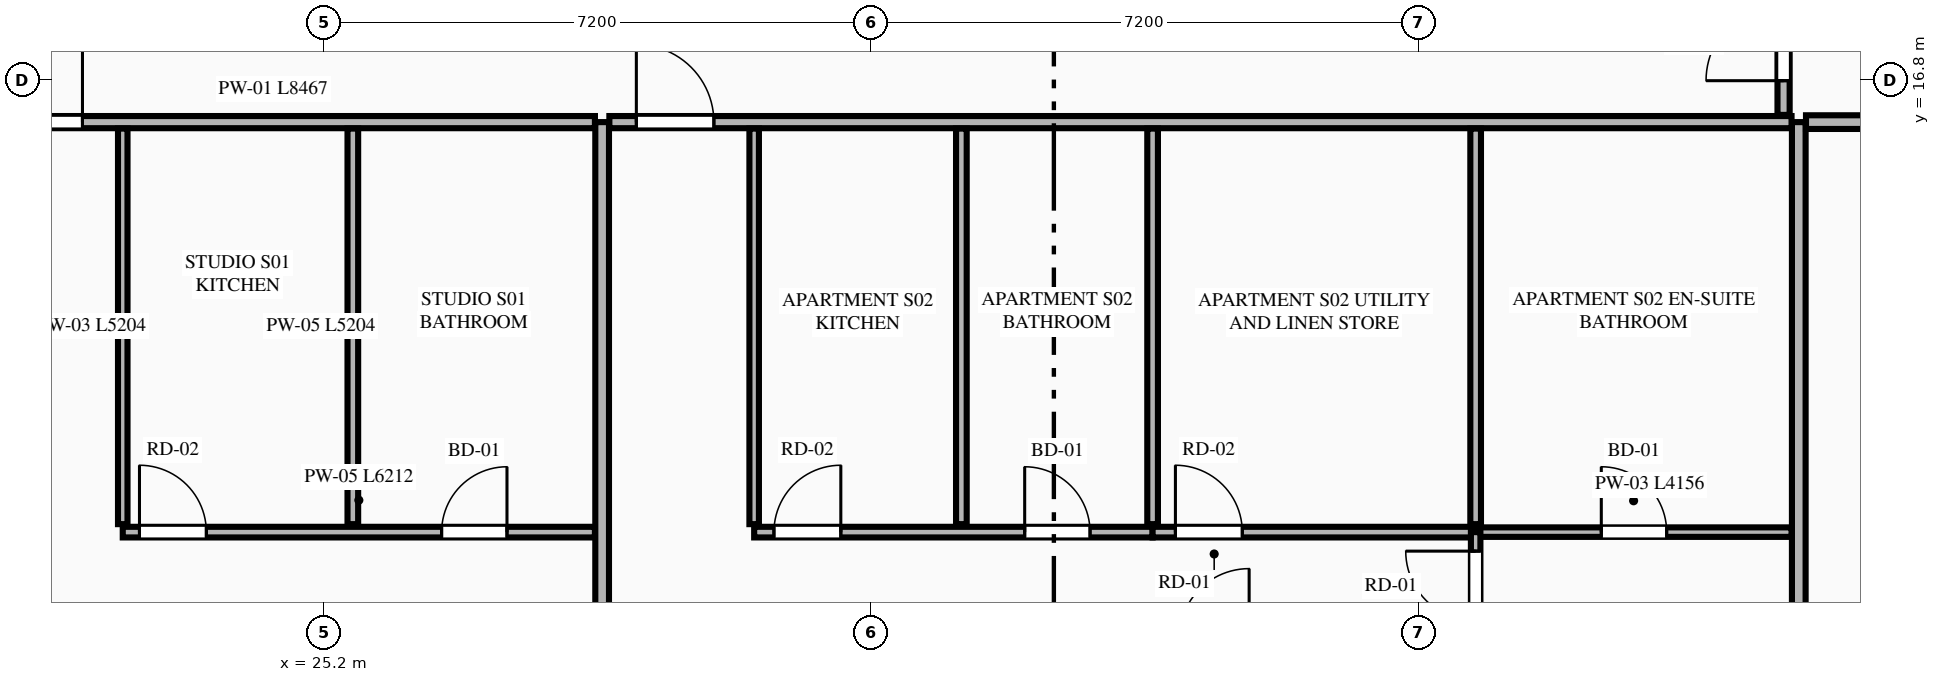
"""IFC4 building model, lengths in metres.
Left out: names, types, materials, properties, quantities, classifications, styles, units other than length and angle.
Written with IfcOpenShell. Run it as: python <this file> out.ifc"""

import sys

from ifc_helpers import new_model, si_unit, direction, frame, frame_2d, origin, place, context, subcontext, project, spatial, rectangle, extrude, element, fill, save


model = new_model("IFC4")
c1 = context("Model", 3, precision=1e-05, world=origin(), true_north=direction((0.0, 1.0)))
c2 = subcontext(c1, "Body", "Model", "MODEL_VIEW")
j1 = project(units=[si_unit("LENGTHUNIT", "METRE"), si_unit("PLANEANGLEUNIT", "RADIAN")], contexts=[c1])
p1 = place(None, origin())
s1 = spatial("IfcSite", under=j1, at=p1, CompositionType="ELEMENT")
p2 = place(p1, origin())
s2 = spatial("IfcBuilding", under=s1, at=p2, CompositionType="ELEMENT")
p3 = place(p2, frame((0.0, 0.0, 182.55)))
s3 = spatial("IfcBuildingStorey", under=s2, at=p3, CompositionType="ELEMENT", Elevation=182.55)
p4 = place(p3, frame((28.857, 5.755, 0.0), z_axis=(0.0, 0.0, 1.0), x_axis=(0.0, 1.0, 0.0)))
e1 = element("IfcWall", 1, at=p4, inside=s3, PredefinedType="PARTITIONING", context=c2, shape_type="SweptSolid", body=[
    extrude(rectangle(XDim=10.495, YDim=0.18, at=frame_2d((5.248, 0.0))), origin(), (0.0, 0.0, 1.0), 2.807),
])
p5 = place(p3, frame((44.6, 5.968, 0.0), z_axis=(0.0, 0.0, 1.0), x_axis=(0.0, 1.0, 0.0)))
e2 = element("IfcWall", 2, at=p5, inside=s3, PredefinedType="PARTITIONING", context=c2, shape_type="SweptSolid", body=[
    extrude(rectangle(XDim=10.282, YDim=0.18, at=frame_2d((5.141, 0.0))), origin(), (0.0, 0.0, 1.0), 3.35),
])
p6 = place(p3, frame((20.295, 16.25, 0.0), z_axis=(0.0, 0.0, 1.0), x_axis=(1.0, 0.0, 0.0)))
e3 = element("IfcWall", 3, at=p6, inside=s3, PredefinedType="PARTITIONING", context=c2, shape_type="SweptSolid", body=[
    extrude(rectangle(XDim=8.467, YDim=0.16, at=frame_2d((4.233, 0.0))), origin(), (0.0, 0.0, 1.0), 3.35),
])
p7 = place(p6, frame((0.705, 0.0, 0.0)))
e4 = element("IfcOpeningElement", 4, at=p7, cuts=e3, PredefinedType="OPENING", context=c2, shape_type="SweptSolid", body=[
    extrude(rectangle(XDim=1.02, YDim=2.25, at=frame_2d((0.51, 1.125))), frame((0.0, 0.09, 0.0), z_axis=(0.0, -1.0, 0.0), x_axis=(1.0, 0.0, 0.0)), (0.0, 0.0, 1.0), 0.18),
])
p8 = place(p3, frame((22.55, 10.961, 0.0), z_axis=(0.0, 0.0, 1.0), x_axis=(0.0, 1.0, 0.0)))
e5 = element("IfcWall", 5, at=p8, inside=s3, PredefinedType="PARTITIONING", context=c2, shape_type="SweptSolid", body=[
    extrude(rectangle(XDim=5.204, YDim=0.125, at=frame_2d((2.602, 0.0))), origin(), (0.0, 0.0, 1.0), 2.807),
])
p9 = place(p3, frame((22.55, 10.856, 0.0), z_axis=(0.0, 0.0, 1.0), x_axis=(1.0, 0.0, 0.0)))
e6 = element("IfcWall", 6, at=p9, inside=s3, PredefinedType="PLUMBINGWALL", context=c2, shape_type="SweptSolid", body=[
    extrude(rectangle(XDim=6.212, YDim=0.14, at=frame_2d((3.106, 0.0))), origin(), (0.0, 0.0, 1.0), 3.35),
])
p10 = place(p9, frame((4.195, 0.0, 0.0)))
e7 = element("IfcOpeningElement", 7, at=p10, cuts=e6, PredefinedType="OPENING", context=c2, shape_type="SweptSolid", body=[
    extrude(rectangle(XDim=0.86, YDim=2.1, at=frame_2d((0.43, 1.05))), frame((0.0, 0.08, 0.0), z_axis=(0.0, -1.0, 0.0), x_axis=(1.0, 0.0, 0.0)), (0.0, 0.0, 1.0), 0.16),
])
p11 = place(p9, frame((0.22, 0.0, 0.0)))
e8 = element("IfcOpeningElement", 8, at=p11, cuts=e6, PredefinedType="OPENING", context=c2, shape_type="SweptSolid", body=[
    extrude(rectangle(XDim=0.88, YDim=2.15, at=frame_2d((0.44, 1.075))), frame((0.0, 0.08, 0.0), z_axis=(0.0, -1.0, 0.0), x_axis=(1.0, 0.0, 0.0)), (0.0, 0.0, 1.0), 0.16),
])
p12 = place(p3, frame((25.577, 10.961, 0.0), z_axis=(0.0, 0.0, 1.0), x_axis=(0.0, 1.0, 0.0)))
e9 = element("IfcWall", 9, at=p12, inside=s3, PredefinedType="PLUMBINGWALL", context=c2, shape_type="SweptSolid", body=[
    extrude(rectangle(XDim=5.204, YDim=0.14, at=frame_2d((2.602, 0.0))), origin(), (0.0, 0.0, 1.0), 3.35),
])
p13 = place(p3, frame((28.952, 16.25, 0.0), z_axis=(0.0, 0.0, 1.0), x_axis=(1.0, 0.0, 0.0)))
e10 = element("IfcWall", 10, at=p13, inside=s3, PredefinedType="PARTITIONING", context=c2, shape_type="SweptSolid", body=[
    extrude(rectangle(XDim=15.553, YDim=0.16, at=frame_2d((7.776, 0.0))), origin(), (0.0, 0.0, 1.0), 3.35),
])
p14 = place(p13, frame((0.355, 0.0, 0.0)))
e11 = element("IfcOpeningElement", 11, at=p14, cuts=e10, PredefinedType="OPENING", context=c2, shape_type="SweptSolid", body=[
    extrude(rectangle(XDim=1.02, YDim=2.25, at=frame_2d((0.51, 1.125))), frame((0.0, 0.09, 0.0), z_axis=(0.0, -1.0, 0.0), x_axis=(1.0, 0.0, 0.0)), (0.0, 0.0, 1.0), 0.18),
])
p15 = place(p3, frame((30.857, 10.961, 0.0), z_axis=(0.0, 0.0, 1.0), x_axis=(0.0, 1.0, 0.0)))
e12 = element("IfcWall", 12, at=p15, inside=s3, PredefinedType="PARTITIONING", context=c2, shape_type="SweptSolid", body=[
    extrude(rectangle(XDim=5.204, YDim=0.125, at=frame_2d((2.602, 0.0))), origin(), (0.0, 0.0, 1.0), 3.35),
])
p16 = place(p3, frame((30.857, 10.856, 0.0), z_axis=(0.0, 0.0, 1.0), x_axis=(1.0, 0.0, 0.0)))
e13 = element("IfcWall", 13, at=p16, inside=s3, PredefinedType="PLUMBINGWALL", context=c2, shape_type="SweptSolid", body=[
    extrude(rectangle(XDim=5.242, YDim=0.14, at=frame_2d((2.621, 0.0))), origin(), (0.0, 0.0, 1.0), 3.35),
])
p17 = place(p16, frame((3.559, 0.0, 0.0)))
e14 = element("IfcOpeningElement", 14, at=p17, cuts=e13, PredefinedType="OPENING", context=c2, shape_type="SweptSolid", body=[
    extrude(rectangle(XDim=0.86, YDim=2.1, at=frame_2d((0.43, 1.05))), frame((0.0, 0.08, 0.0), z_axis=(0.0, -1.0, 0.0), x_axis=(1.0, 0.0, 0.0)), (0.0, 0.0, 1.0), 0.16),
])
p18 = place(p16, frame((0.26, 0.0, 0.0)))
e15 = element("IfcOpeningElement", 15, at=p18, cuts=e13, PredefinedType="OPENING", context=c2, shape_type="SweptSolid", body=[
    extrude(rectangle(XDim=0.88, YDim=2.15, at=frame_2d((0.44, 1.075))), frame((0.0, 0.08, 0.0), z_axis=(0.0, -1.0, 0.0), x_axis=(1.0, 0.0, 0.0)), (0.0, 0.0, 1.0), 0.16),
])
p19 = place(p3, frame((36.099, 10.856, 0.0), z_axis=(0.0, 0.0, 1.0), x_axis=(1.0, 0.0, 0.0)))
e16 = element("IfcWall", 16, at=p19, inside=s3, PredefinedType="PLUMBINGWALL", context=c2, shape_type="SweptSolid", body=[
    extrude(rectangle(XDim=4.25, YDim=0.14, at=frame_2d((2.125, 0.0))), origin(), (0.0, 0.0, 1.0), 3.35),
])
p20 = place(p19, frame((0.3, 0.0, 0.0)))
e17 = element("IfcOpeningElement", 17, at=p20, cuts=e16, PredefinedType="OPENING", context=c2, shape_type="SweptSolid", body=[
    extrude(rectangle(XDim=0.88, YDim=2.15, at=frame_2d((0.44, 1.075))), frame((0.0, 0.08, 0.0), z_axis=(0.0, -1.0, 0.0), x_axis=(1.0, 0.0, 0.0)), (0.0, 0.0, 1.0), 0.16),
])
p21 = place(p3, frame((40.349, 10.856, 0.0), z_axis=(0.0, 0.0, 1.0), x_axis=(1.0, 0.0, 0.0)))
e18 = element("IfcWall", 18, at=p21, inside=s3, PredefinedType="PARTITIONING", context=c2, shape_type="SweptSolid", body=[
    extrude(rectangle(XDim=4.156, YDim=0.125, at=frame_2d((2.078, 0.0))), origin(), (0.0, 0.0, 1.0), 3.35),
])
p22 = place(p21, frame((1.653, 0.0, 0.0)))
e19 = element("IfcOpeningElement", 19, at=p22, cuts=e18, PredefinedType="OPENING", context=c2, shape_type="SweptSolid", body=[
    extrude(rectangle(XDim=0.86, YDim=2.1, at=frame_2d((0.43, 1.05))), frame((0.0, 0.073, 0.0), z_axis=(0.0, -1.0, 0.0), x_axis=(1.0, 0.0, 0.0)), (0.0, 0.0, 1.0), 0.145),
])
p23 = place(p3, frame((33.583, 10.961, 0.0), z_axis=(0.0, 0.0, 1.0), x_axis=(0.0, 1.0, 0.0)))
e20 = element("IfcWall", 20, at=p23, inside=s3, PredefinedType="PLUMBINGWALL", context=c2, shape_type="SweptSolid", body=[
    extrude(rectangle(XDim=5.204, YDim=0.14, at=frame_2d((2.602, 0.0))), origin(), (0.0, 0.0, 1.0), 3.35),
])
p24 = place(p3, frame((40.349, 9.526, 0.0), z_axis=(0.0, 0.0, 1.0), x_axis=(0.0, 1.0, 0.0)))
e21 = element("IfcWall", 21, at=p24, inside=s3, PredefinedType="PARTITIONING", context=c2, shape_type="SweptSolid", body=[
    extrude(rectangle(XDim=1.33, YDim=0.125, at=frame_2d((0.665, 0.0))), origin(), (0.0, 0.0, 1.0), 3.35),
])
p25 = place(p24, frame((0.16, 0.0, 0.0)))
e22 = element("IfcOpeningElement", 22, at=p25, cuts=e21, PredefinedType="OPENING", context=c2, shape_type="SweptSolid", body=[
    extrude(rectangle(XDim=0.92, YDim=2.15, at=frame_2d((0.46, 1.075))), frame((0.0, 0.073, 0.0), z_axis=(0.0, -1.0, 0.0), x_axis=(1.0, 0.0, 0.0)), (0.0, 0.0, 1.0), 0.145),
])
for number, where, z_axis, x_axis in (
    (23, (36.099, 10.961, 0.0), (0.0, 0.0, 1.0), (0.0, 1.0, 0.0)),
    (24, (40.349, 10.961, 0.0), (0.0, 0.0, 1.0), (0.0, 1.0, 0.0)),
):
    element("IfcWall", number, at=place(p3, frame(where, z_axis=z_axis, x_axis=x_axis)), inside=s3, PredefinedType="PLUMBINGWALL", context=c2, shape_type="SweptSolid", body=[
        extrude(rectangle(XDim=5.204, YDim=0.14, at=frame_2d((2.602, 0.0))), origin(), (0.0, 0.0, 1.0), 3.35),
    ])
p26 = place(p3, frame((44.695, 16.25, 0.0), z_axis=(0.0, 0.0, 1.0), x_axis=(1.0, 0.0, 0.0)))
e25 = element("IfcWall", 25, at=p26, inside=s3, PredefinedType="PARTITIONING", context=c2, shape_type="SweptSolid", body=[
    extrude(rectangle(XDim=5.894, YDim=0.18, at=frame_2d((2.947, 0.0))), origin(), (0.0, 0.0, 1.0), 3.35),
])
p27 = place(p3, frame((44.4, 16.345, 0.0), z_axis=(0.0, 0.0, 1.0), x_axis=(0.0, 1.0, 0.0)))
e26 = element("IfcWall", 26, at=p27, inside=s3, PredefinedType="PARTITIONING", context=c2, shape_type="SweptSolid", body=[
    extrude(rectangle(XDim=18.71, YDim=0.16, at=frame_2d((9.355, 0.0))), origin(), (0.0, 0.0, 1.0), 3.35),
])
p28 = place(p27, frame((0.45, 0.0, 0.0)))
e27 = element("IfcOpeningElement", 27, at=p28, cuts=e26, PredefinedType="OPENING", context=c2, shape_type="SweptSolid", body=[
    extrude(rectangle(XDim=1.02, YDim=2.25, at=frame_2d((0.51, 1.125))), frame((0.0, 0.09, 0.0), z_axis=(0.0, -1.0, 0.0), x_axis=(1.0, 0.0, 0.0)), (0.0, 0.0, 1.0), 0.18),
])
p29 = place(p10, origin())
e28 = element("IfcDoor", 28, at=p29, inside=s3, OperationType="SINGLE_SWING_RIGHT", PredefinedType="DOOR", context=c2, shape_type="SweptSolid", body=[
    extrude(rectangle(XDim=0.86, YDim=2.1, at=frame_2d((0.43, 1.05))), frame((0.0, 0.025, 0.0), z_axis=(0.0, -1.0, 0.0), x_axis=(1.0, 0.0, 0.0)), (0.0, 0.0, 1.0), 0.05),
])
fill(e7, e28)
p30 = place(p7, origin())
e29 = element("IfcDoor", 29, at=p30, inside=s3, OperationType="SINGLE_SWING_RIGHT", PredefinedType="DOOR", context=c2, shape_type="SweptSolid", body=[
    extrude(rectangle(XDim=1.02, YDim=2.25, at=frame_2d((0.51, 1.125))), frame((0.0, 0.025, 0.0), z_axis=(0.0, -1.0, 0.0), x_axis=(1.0, 0.0, 0.0)), (0.0, 0.0, 1.0), 0.05),
])
fill(e4, e29)
p31 = place(p11, origin())
e30 = element("IfcDoor", 30, at=p31, inside=s3, OperationType="SINGLE_SWING_LEFT", PredefinedType="DOOR", context=c2, shape_type="SweptSolid", body=[
    extrude(rectangle(XDim=0.88, YDim=2.15, at=frame_2d((0.44, 1.075))), frame((0.0, 0.025, 0.0), z_axis=(0.0, -1.0, 0.0), x_axis=(1.0, 0.0, 0.0)), (0.0, 0.0, 1.0), 0.05),
])
fill(e8, e30)
p32 = place(p17, origin())
e31 = element("IfcDoor", 31, at=p32, inside=s3, OperationType="SINGLE_SWING_LEFT", PredefinedType="DOOR", context=c2, shape_type="SweptSolid", body=[
    extrude(rectangle(XDim=0.86, YDim=2.1, at=frame_2d((0.43, 1.05))), frame((0.0, 0.025, 0.0), z_axis=(0.0, -1.0, 0.0), x_axis=(1.0, 0.0, 0.0)), (0.0, 0.0, 1.0), 0.05),
])
fill(e14, e31)
p33 = place(p22, origin())
e32 = element("IfcDoor", 32, at=p33, inside=s3, OperationType="SINGLE_SWING_LEFT", PredefinedType="DOOR", context=c2, shape_type="SweptSolid", body=[
    extrude(rectangle(XDim=0.86, YDim=2.1, at=frame_2d((0.43, 1.05))), frame((0.0, 0.025, 0.0), z_axis=(0.0, -1.0, 0.0), x_axis=(1.0, 0.0, 0.0)), (0.0, 0.0, 1.0), 0.05),
])
fill(e19, e32)
p34 = place(p14, origin())
e33 = element("IfcDoor", 33, at=p34, inside=s3, OperationType="SINGLE_SWING_LEFT", PredefinedType="DOOR", context=c2, shape_type="SweptSolid", body=[
    extrude(rectangle(XDim=1.02, YDim=2.25, at=frame_2d((0.51, 1.125))), frame((0.0, 0.025, 0.0), z_axis=(0.0, -1.0, 0.0), x_axis=(1.0, 0.0, 0.0)), (0.0, 0.0, 1.0), 0.05),
])
fill(e11, e33)
p35 = place(p18, origin())
e34 = element("IfcDoor", 34, at=p35, inside=s3, OperationType="SINGLE_SWING_RIGHT", PredefinedType="DOOR", context=c2, shape_type="SweptSolid", body=[
    extrude(rectangle(XDim=0.88, YDim=2.15, at=frame_2d((0.44, 1.075))), frame((0.0, 0.025, 0.0), z_axis=(0.0, -1.0, 0.0), x_axis=(1.0, 0.0, 0.0)), (0.0, 0.0, 1.0), 0.05),
])
fill(e15, e34)
p36 = place(p20, origin())
e35 = element("IfcDoor", 35, at=p36, inside=s3, OperationType="SINGLE_SWING_LEFT", PredefinedType="DOOR", context=c2, shape_type="SweptSolid", body=[
    extrude(rectangle(XDim=0.88, YDim=2.15, at=frame_2d((0.44, 1.075))), frame((0.0, 0.025, 0.0), z_axis=(0.0, -1.0, 0.0), x_axis=(1.0, 0.0, 0.0)), (0.0, 0.0, 1.0), 0.05),
])
fill(e17, e35)
p37 = place(p25, origin())
e36 = element("IfcDoor", 36, at=p37, inside=s3, OperationType="SINGLE_SWING_RIGHT", PredefinedType="DOOR", context=c2, shape_type="SweptSolid", body=[
    extrude(rectangle(XDim=0.92, YDim=2.15, at=frame_2d((0.46, 1.075))), frame((0.0, 0.025, 0.0), z_axis=(0.0, -1.0, 0.0), x_axis=(1.0, 0.0, 0.0)), (0.0, 0.0, 1.0), 0.05),
])
fill(e22, e36)
p38 = place(p28, origin())
e37 = element("IfcDoor", 37, at=p38, inside=s3, OperationType="SINGLE_SWING_LEFT", PredefinedType="DOOR", context=c2, shape_type="SweptSolid", body=[
    extrude(rectangle(XDim=1.02, YDim=2.25, at=frame_2d((0.51, 1.125))), frame((0.0, 0.025, 0.0), z_axis=(0.0, -1.0, 0.0), x_axis=(1.0, 0.0, 0.0)), (0.0, 0.0, 1.0), 0.05),
])
fill(e27, e37)
save(model, sys.argv[1])
